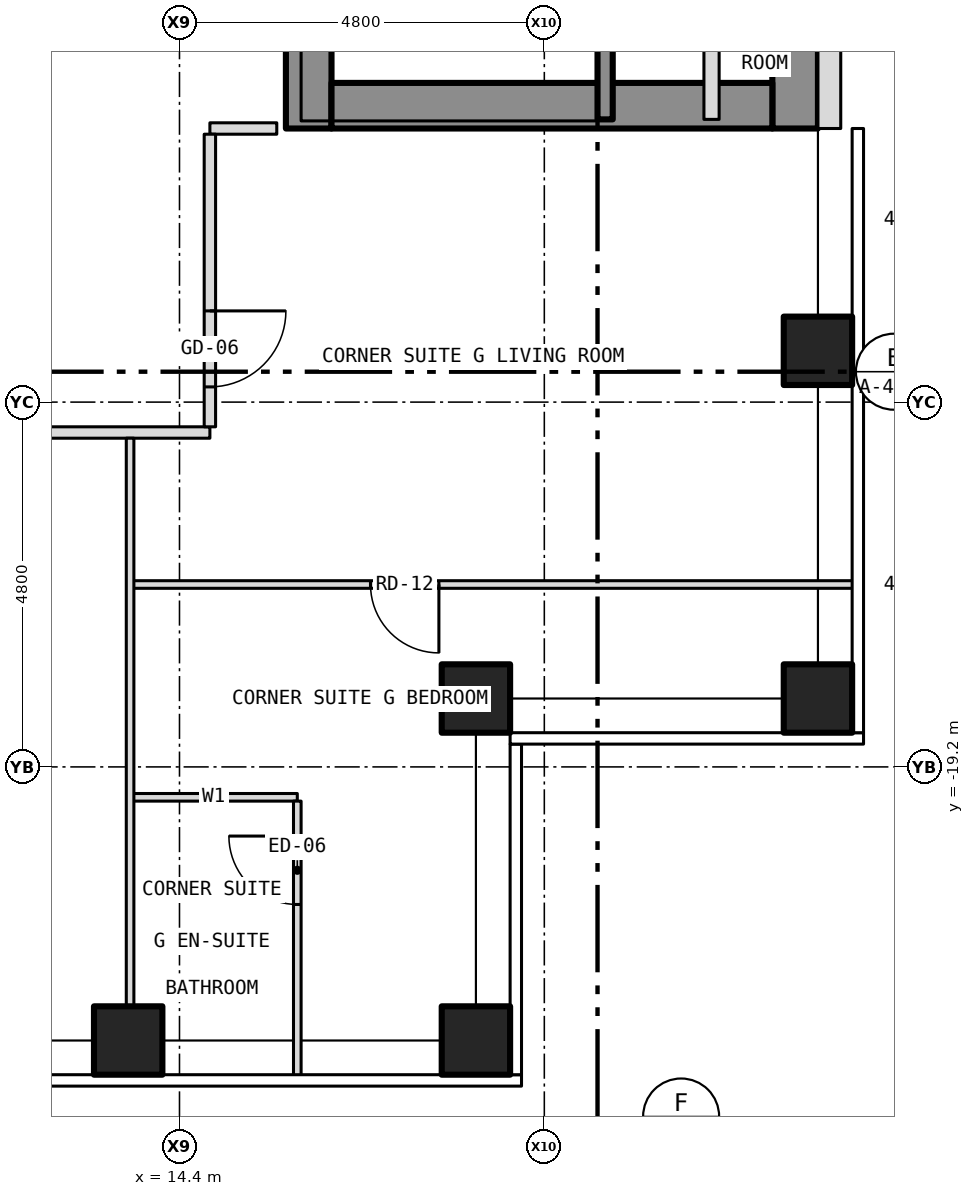
"""IFC4 building model, lengths in metres.
Left out: names, types, materials, properties, quantities, classifications, styles, units other than length and angle.
Written with IfcOpenShell. Run it as: python <this file> out.ifc"""

import sys

from ifc_helpers import new_model, si_unit, direction, frame, frame_2d, origin, origin_2d, place, context, subcontext, project, spatial, rectangle, hollow_rectangle, extrude, element, fill, save


model = new_model("IFC4")
c1 = context("Model", 3, precision=1e-05, world=origin(), true_north=direction((0.0, 1.0)))
c2 = subcontext(c1, "Body", "Model", "MODEL_VIEW")
j1 = project(units=[si_unit("LENGTHUNIT", "METRE"), si_unit("PLANEANGLEUNIT", "RADIAN")], contexts=[c1])
p1 = place(None, origin())
s1 = spatial("IfcSite", under=j1, at=p1, CompositionType="ELEMENT")
p2 = place(p1, origin())
s2 = spatial("IfcBuilding", under=s1, at=p2, CompositionType="ELEMENT")
p3 = place(p2, frame((0.0, 0.0, 131.0)))
s3 = spatial("IfcBuildingStorey", under=s2, at=p3, CompositionType="ELEMENT", Elevation=131.0)
for number, where, z_axis, x_axis in (
    (1, (13.725, -22.8, -0.15), (0.0, 0.0, 1.0), (1.0, 0.0, 0.0)),
    (2, (18.3, -22.8, -0.15), (0.0, 0.0, 1.0), (1.0, 0.0, 0.0)),
    (3, (22.8, -18.3, -0.15), (0.0, 0.0, 1.0), (1.0, 0.0, 0.0)),
    (4, (22.8, -13.725, -0.15), (0.0, 0.0, 1.0), (1.0, 0.0, 0.0)),
    (5, (18.3, -18.3, -0.15), (0.0, 0.0, 1.0), (1.0, 0.0, 0.0)),
):
    element("IfcColumn", number, at=place(p3, frame(where, z_axis=z_axis, x_axis=x_axis)), inside=s3, PredefinedType="COLUMN", context=c2, shape_type="SweptSolid", body=[
        extrude(hollow_rectangle(XDim=0.9, YDim=0.9, WallThickness=0.05, at=origin_2d()), origin(), (0.0, 0.0, 1.0), 3.5),
    ])
p4 = place(p3, frame((16.1, -10.8, 0.0), z_axis=(0.0, 0.0, 1.0), x_axis=(0.0, 1.0, 0.0)))
e6 = element("IfcWall", 6, at=p4, inside=s3, PredefinedType="SHEAR", context=c2, shape_type="SweptSolid", body=[
    extrude(rectangle(XDim=21.6, YDim=0.6, at=frame_2d((10.8, 0.0))), origin(), (0.0, 0.0, 1.0), 3.25),
])
p5 = place(p4, frame((9.4, 0.0, 0.0)))
e7 = element("IfcOpeningElement", 7, at=p5, cuts=e6, PredefinedType="OPENING", context=c2, shape_type="SweptSolid", body=[
    extrude(rectangle(XDim=1.1, YDim=2.1, at=frame_2d((0.55, 1.05))), frame((0.0, 0.312, 0.0), z_axis=(0.0, -1.0, 0.0), x_axis=(1.0, 0.0, 0.0)), (0.0, 0.0, 1.0), 0.624),
])
p6 = place(p4, frame((11.5, 0.0, 0.0)))
e8 = element("IfcOpeningElement", 8, at=p6, cuts=e6, PredefinedType="OPENING", context=c2, shape_type="SweptSolid", body=[
    extrude(rectangle(XDim=1.1, YDim=2.1, at=frame_2d((0.55, 1.05))), frame((0.0, 0.312, 0.0), z_axis=(0.0, -1.0, 0.0), x_axis=(1.0, 0.0, 0.0)), (0.0, 0.0, 1.0), 0.624),
])
p7 = place(p4, frame((13.6, 0.0, 0.0)))
e9 = element("IfcOpeningElement", 9, at=p7, cuts=e6, PredefinedType="OPENING", context=c2, shape_type="SweptSolid", body=[
    extrude(rectangle(XDim=1.1, YDim=2.1, at=frame_2d((0.55, 1.05))), frame((0.0, 0.312, 0.0), z_axis=(0.0, -1.0, 0.0), x_axis=(1.0, 0.0, 0.0)), (0.0, 0.0, 1.0), 0.624),
])
p8 = place(p4, frame((15.7, 0.0, 0.0)))
e10 = element("IfcOpeningElement", 10, at=p8, cuts=e6, PredefinedType="OPENING", context=c2, shape_type="SweptSolid", body=[
    extrude(rectangle(XDim=1.1, YDim=2.1, at=frame_2d((0.55, 1.05))), frame((0.0, 0.312, 0.0), z_axis=(0.0, -1.0, 0.0), x_axis=(1.0, 0.0, 0.0)), (0.0, 0.0, 1.0), 0.624),
])
p9 = place(p4, frame((17.8, 0.0, 0.0)))
e11 = element("IfcOpeningElement", 11, at=p9, cuts=e6, PredefinedType="OPENING", context=c2, shape_type="SweptSolid", body=[
    extrude(rectangle(XDim=1.1, YDim=2.1, at=frame_2d((0.55, 1.05))), frame((0.0, 0.312, 0.0), z_axis=(0.0, -1.0, 0.0), x_axis=(1.0, 0.0, 0.0)), (0.0, 0.0, 1.0), 0.624),
])
p10 = place(p4, frame((5.642, 0.0, 0.0)))
e12 = element("IfcOpeningElement", 12, at=p10, cuts=e6, PredefinedType="OPENING", context=c2, shape_type="SweptSolid", body=[
    extrude(rectangle(XDim=1.1, YDim=2.1, at=frame_2d((0.55, 1.05))), frame((0.0, 0.312, 0.0), z_axis=(0.0, -1.0, 0.0), x_axis=(1.0, 0.0, 0.0)), (0.0, 0.0, 1.0), 0.624),
])
p11 = place(p4, frame((7.5, 0.0, 0.0)))
e13 = element("IfcOpeningElement", 13, at=p11, cuts=e6, PredefinedType="OPENING", context=c2, shape_type="SweptSolid", body=[
    extrude(rectangle(XDim=1.1, YDim=2.1, at=frame_2d((0.55, 1.05))), frame((0.0, 0.312, 0.0), z_axis=(0.0, -1.0, 0.0), x_axis=(1.0, 0.0, 0.0)), (0.0, 0.0, 1.0), 0.624),
])
p12 = place(p3, frame((22.5, -10.8, 0.0), z_axis=(0.0, 0.0, 1.0), x_axis=(0.0, 1.0, 0.0)))
e14 = element("IfcWall", 14, at=p12, inside=s3, PredefinedType="SHEAR", context=c2, shape_type="SweptSolid", body=[
    extrude(rectangle(XDim=21.6, YDim=0.6, at=frame_2d((10.8, 0.0))), origin(), (0.0, 0.0, 1.0), 3.25),
])
p13 = place(p3, frame((16.4, -10.5, 0.0), z_axis=(0.0, 0.0, 1.0), x_axis=(1.0, 0.0, 0.0)))
e15 = element("IfcWall", 15, at=p13, inside=s3, PredefinedType="SHEAR", context=c2, shape_type="SweptSolid", body=[
    extrude(rectangle(XDim=5.8, YDim=0.6, at=frame_2d((2.9, 0.0))), origin(), (0.0, 0.0, 1.0), 3.25),
])
p14 = place(p3, frame((22.95, -10.8, 0.0), z_axis=(0.0, 0.0, 1.0), x_axis=(0.0, 1.0, 0.0)))
e16 = element("IfcWall", 16, at=p14, inside=s3, PredefinedType="SOLIDWALL", context=c2, shape_type="SweptSolid", body=[
    extrude(rectangle(XDim=21.6, YDim=0.3, at=frame_2d((10.8, 0.0))), origin(), (0.0, 0.0, 1.0), 3.5),
])
p15 = place(p14, frame((2.95, 0.0, 1.0)))
e17 = element("IfcOpeningElement", 17, at=p15, cuts=e16, PredefinedType="OPENING", context=c2, shape_type="SweptSolid", body=[
    extrude(rectangle(XDim=0.6, YDim=1.5, at=frame_2d((0.3, 0.75))), frame((0.0, 0.162, 0.0), z_axis=(0.0, -1.0, 0.0), x_axis=(1.0, 0.0, 0.0)), (0.0, 0.0, 1.0), 0.324),
])
p16 = place(p3, frame((13.75, -19.6, 0.0), z_axis=(0.0, 0.0, 1.0), x_axis=(1.0, 0.0, 0.0)))
e18 = element("IfcWall", 18, at=p16, inside=s3, PredefinedType="PARTITIONING", context=c2, shape_type="SweptSolid", body=[
    extrude(rectangle(XDim=2.2, YDim=0.1, at=frame_2d((1.1, 0.0))), origin(), (0.0, 0.0, 1.0), 3.35),
])
p17 = place(p3, frame((13.75, -16.8, 0.0), z_axis=(0.0, 0.0, 1.0), x_axis=(1.0, 0.0, 0.0)))
e19 = element("IfcWall", 19, at=p17, inside=s3, PredefinedType="PARTITIONING", context=c2, shape_type="SweptSolid", body=[
    extrude(rectangle(XDim=9.53, YDim=0.1, at=frame_2d((4.765, 0.0))), origin(), (0.0, 0.0, 1.0), 3.35),
])
p18 = place(p17, frame((3.163, 0.0, 0.0)))
e20 = element("IfcOpeningElement", 20, at=p18, cuts=e19, PredefinedType="OPENING", context=c2, shape_type="SweptSolid", body=[
    extrude(rectangle(XDim=0.9, YDim=2.1, at=frame_2d((0.45, 1.05))), frame((0.0, 0.062, 0.0), z_axis=(0.0, -1.0, 0.0), x_axis=(1.0, 0.0, 0.0)), (0.0, 0.0, 1.0), 0.124),
])
p19 = place(p3, frame((7.95, -14.8, 0.0), z_axis=(0.0, 0.0, 1.0), x_axis=(1.0, 0.0, 0.0)))
e21 = element("IfcWall", 21, at=p19, inside=s3, PredefinedType="PARTITIONING", context=c2, shape_type="SweptSolid", body=[
    extrude(rectangle(XDim=6.85, YDim=0.15, at=frame_2d((3.425, 0.0))), origin(), (0.0, 0.0, 1.0), 3.35),
])
p20 = place(p19, frame((3.487, 0.0, 0.0)))
e22 = element("IfcOpeningElement", 22, at=p20, cuts=e21, PredefinedType="OPENING", context=c2, shape_type="SweptSolid", body=[
    extrude(rectangle(XDim=1.0, YDim=2.1, at=frame_2d((0.5, 1.05))), frame((0.0, 0.087, 0.0), z_axis=(0.0, -1.0, 0.0), x_axis=(1.0, 0.0, 0.0)), (0.0, 0.0, 1.0), 0.174),
])
p21 = place(p3, frame((14.8, -10.8, 0.0), z_axis=(0.0, 0.0, 1.0), x_axis=(1.0, 0.0, 0.0)))
e23 = element("IfcWall", 23, at=p21, inside=s3, PredefinedType="PARTITIONING", context=c2, shape_type="SweptSolid", body=[
    extrude(rectangle(XDim=0.88, YDim=0.15, at=frame_2d((0.44, 0.0))), origin(), (0.0, 0.0, 1.0), 3.35),
])
p22 = place(p3, frame((13.75, -22.68, 0.0), z_axis=(0.0, 0.0, 1.0), x_axis=(0.0, 1.0, 0.0)))
e24 = element("IfcWall", 24, at=p22, inside=s3, PredefinedType="PARTITIONING", context=c2, shape_type="SweptSolid", body=[
    extrude(rectangle(XDim=7.805, YDim=0.1, at=frame_2d((3.902, 0.0))), origin(), (0.0, 0.0, 1.0), 3.35),
])
p23 = place(p3, frame((14.8, -14.725, 0.0), z_axis=(0.0, 0.0, 1.0), x_axis=(0.0, 1.0, 0.0)))
e25 = element("IfcWall", 25, at=p23, inside=s3, PredefinedType="PARTITIONING", context=c2, shape_type="SweptSolid", body=[
    extrude(rectangle(XDim=3.85, YDim=0.15, at=frame_2d((1.925, 0.0))), origin(), (0.0, 0.0, 1.0), 3.35),
])
p24 = place(p23, frame((0.525, 0.0, 0.0)))
e26 = element("IfcOpeningElement", 26, at=p24, cuts=e25, PredefinedType="OPENING", context=c2, shape_type="SweptSolid", body=[
    extrude(rectangle(XDim=1.0, YDim=2.1, at=frame_2d((0.5, 1.05))), frame((0.0, 0.087, 0.0), z_axis=(0.0, -1.0, 0.0), x_axis=(1.0, 0.0, 0.0)), (0.0, 0.0, 1.0), 0.174),
])
p25 = place(p3, frame((15.95, -23.28, 0.0), z_axis=(0.0, 0.0, 1.0), x_axis=(0.0, 1.0, 0.0)))
e27 = element("IfcWall", 27, at=p25, inside=s3, PredefinedType="PARTITIONING", context=c2, shape_type="SweptSolid", body=[
    extrude(rectangle(XDim=3.63, YDim=0.1, at=frame_2d((1.815, 0.0))), origin(), (0.0, 0.0, 1.0), 3.35),
])
p26 = place(p25, frame((2.27, 0.0, 0.0)))
e28 = element("IfcOpeningElement", 28, at=p26, cuts=e27, PredefinedType="OPENING", context=c2, shape_type="SweptSolid", body=[
    extrude(rectangle(XDim=0.9, YDim=2.1, at=frame_2d((0.45, 1.05))), frame((0.0, 0.062, 0.0), z_axis=(0.0, -1.0, 0.0), x_axis=(1.0, 0.0, 0.0)), (0.0, 0.0, 1.0), 0.124),
])
p27 = place(p3, frame((20.0, -10.68, 0.0), z_axis=(0.0, 0.0, 1.0), x_axis=(0.0, 1.0, 0.0)))
e29 = element("IfcWall", 29, at=p27, inside=s3, PredefinedType="SHEAR", context=c2, shape_type="SweptSolid", body=[
    extrude(rectangle(XDim=6.98, YDim=0.2, at=frame_2d((3.49, 0.0))), origin(), (0.0, 0.0, 1.0), 3.25),
])
p28 = place(p3, frame((21.4, -10.68, 0.0), z_axis=(0.0, 0.0, 1.0), x_axis=(0.0, 1.0, 0.0)))
e30 = element("IfcWall", 30, at=p28, inside=s3, PredefinedType="PARTITIONING", context=c2, shape_type="SweptSolid", body=[
    extrude(rectangle(XDim=8.68, YDim=0.2, at=frame_2d((4.34, 0.0))), origin(), (0.0, 0.0, 1.0), 3.25),
])
p29 = place(p28, frame((1.21, 0.0, 0.0)))
e31 = element("IfcOpeningElement", 31, at=p29, cuts=e30, PredefinedType="OPENING", context=c2, shape_type="SweptSolid", body=[
    extrude(rectangle(XDim=0.9, YDim=2.1, at=frame_2d((0.45, 1.05))), frame((0.0, 0.112, 0.0), z_axis=(0.0, -1.0, 0.0), x_axis=(1.0, 0.0, 0.0)), (0.0, 0.0, 1.0), 0.224),
])
p30 = place(p28, frame((5.66, 0.0, 0.0)))
e32 = element("IfcOpeningElement", 32, at=p30, cuts=e30, PredefinedType="OPENING", context=c2, shape_type="SweptSolid", body=[
    extrude(rectangle(XDim=0.9, YDim=2.1, at=frame_2d((0.45, 1.05))), frame((0.0, 0.112, 0.0), z_axis=(0.0, -1.0, 0.0), x_axis=(1.0, 0.0, 0.0)), (0.0, 0.0, 1.0), 0.224),
])
p31 = place(p24, origin())
e33 = element("IfcDoor", 33, at=p31, inside=s3, OperationType="SINGLE_SWING_RIGHT", PredefinedType="DOOR", context=c2, shape_type="SweptSolid", body=[
    extrude(rectangle(XDim=1.0, YDim=2.1, at=frame_2d((0.5, 1.05))), frame((0.0, 0.025, 0.0), z_axis=(0.0, -1.0, 0.0), x_axis=(1.0, 0.0, 0.0)), (0.0, 0.0, 1.0), 0.05),
])
fill(e26, e33)
p32 = place(p18, origin())
e34 = element("IfcDoor", 34, at=p32, inside=s3, OperationType="SINGLE_SWING_RIGHT", PredefinedType="DOOR", context=c2, shape_type="SweptSolid", body=[
    extrude(rectangle(XDim=0.9, YDim=2.1, at=frame_2d((0.45, 1.05))), frame((0.0, 0.025, 0.0), z_axis=(0.0, -1.0, 0.0), x_axis=(1.0, 0.0, 0.0)), (0.0, 0.0, 1.0), 0.05),
])
fill(e20, e34)
p33 = place(p26, origin())
e35 = element("IfcDoor", 35, at=p33, inside=s3, OperationType="SINGLE_SWING_RIGHT", PredefinedType="DOOR", context=c2, shape_type="SweptSolid", body=[
    extrude(rectangle(XDim=0.9, YDim=2.1, at=frame_2d((0.45, 1.05))), frame((0.0, 0.025, 0.0), z_axis=(0.0, -1.0, 0.0), x_axis=(1.0, 0.0, 0.0)), (0.0, 0.0, 1.0), 0.05),
])
fill(e28, e35)
save(model, sys.argv[1])
